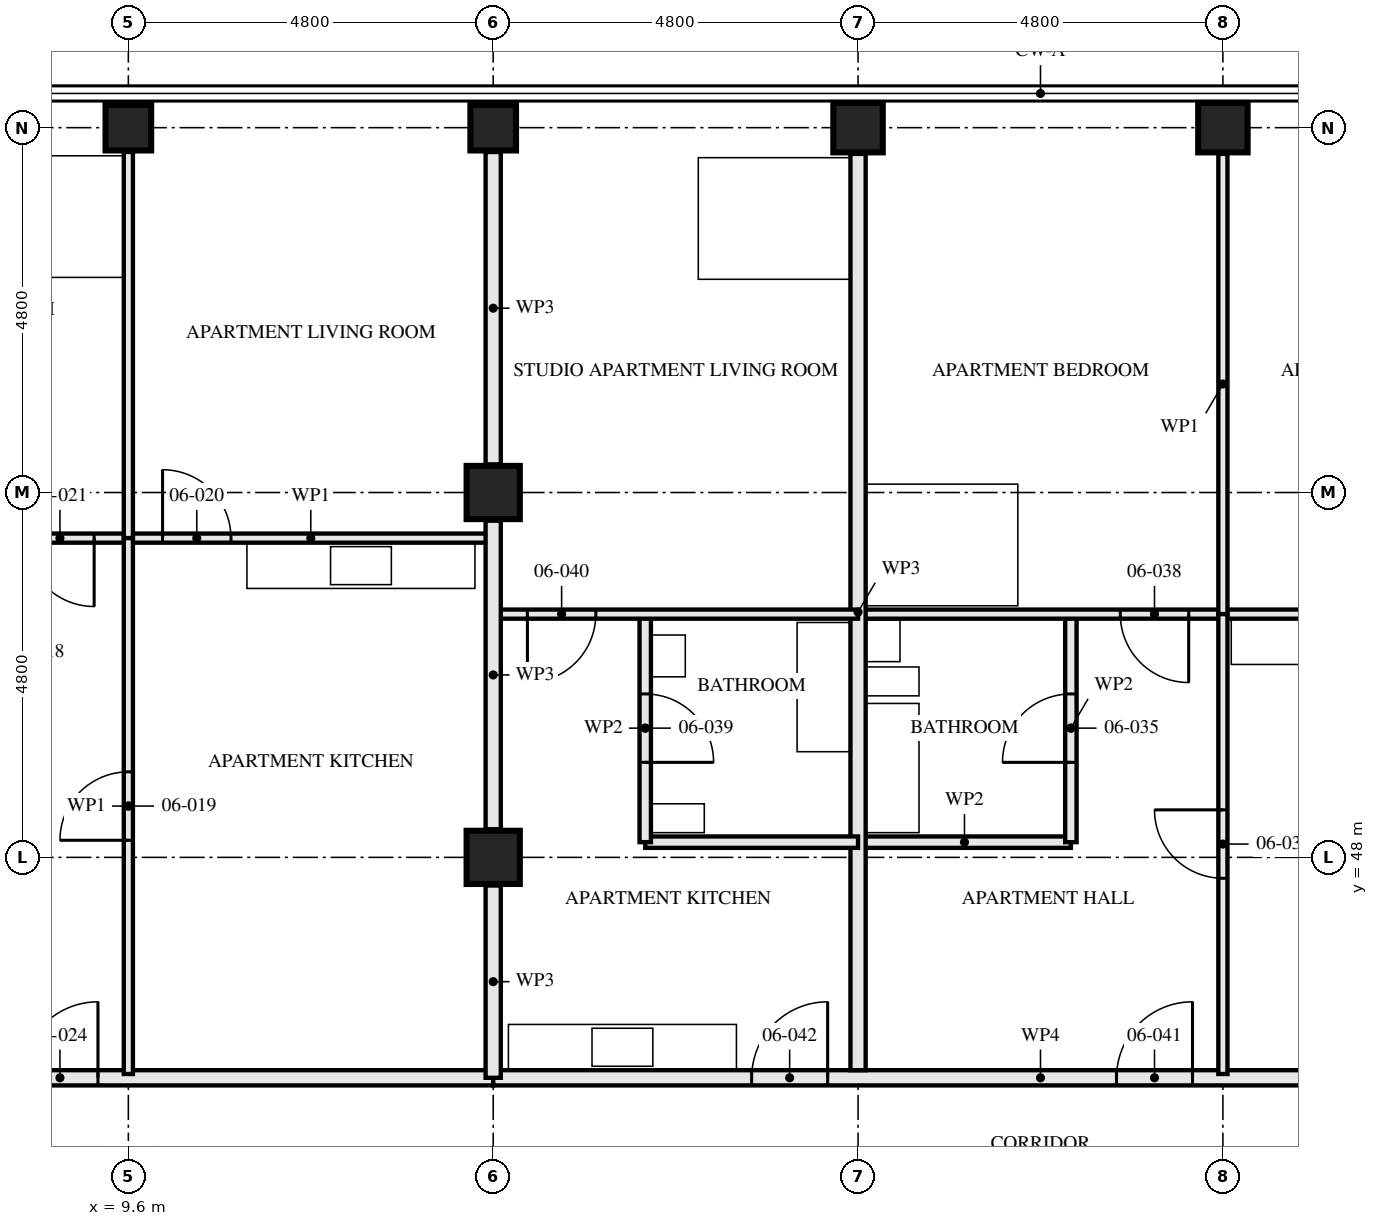
"""IFC4 building model, lengths in metres.
Left out: names, types, materials, properties, quantities, classifications, styles, units other than length and angle.
Written with IfcOpenShell. Run it as: python <this file> out.ifc"""

import sys

from ifc_helpers import new_model, si_unit, direction, frame, frame_2d, origin, origin_2d, place, context, subcontext, project, spatial, rectangle, hollow_rectangle, extrude, element, fill, save


model = new_model("IFC4")
c1 = context("Model", 3, precision=1e-05, world=origin(), true_north=direction((0.0, 1.0)))
c2 = subcontext(c1, "Body", "Model", "MODEL_VIEW")
j1 = project(units=[si_unit("LENGTHUNIT", "METRE"), si_unit("PLANEANGLEUNIT", "RADIAN")], contexts=[c1])
p1 = place(None, origin())
s1 = spatial("IfcSite", under=j1, at=p1, CompositionType="ELEMENT")
p2 = place(p1, origin())
s2 = spatial("IfcBuilding", under=s1, at=p2, CompositionType="ELEMENT")
p3 = place(p2, frame((0.0, 0.0, 27.0)))
s3 = spatial("IfcBuildingStorey", under=s2, at=p3, CompositionType="ELEMENT", Elevation=27.0)
p4 = place(p3, frame((9.6, 57.6, 0.0), z_axis=(0.0, 0.0, 1.0), x_axis=(0.0, 1.0, 0.0)))
e1 = element("IfcColumn", 1, at=p4, inside=s3, PredefinedType="COLUMN", context=c2, shape_type="SweptSolid", body=[
    extrude(hollow_rectangle(XDim=0.6, YDim=0.6, WallThickness=0.08, at=origin_2d()), origin(), (0.0, 0.0, 1.0), 3.5),
])
for number, where, z_axis, x_axis in (
    (2, (14.4, 48.0, 0.0), (0.0, 0.0, 1.0), (1.0, 0.0, 0.0)),
    (3, (14.4, 52.8, 0.0), (0.0, 0.0, 1.0), (1.0, 0.0, 0.0)),
):
    element("IfcColumn", number, at=place(p3, frame(where, z_axis=z_axis, x_axis=x_axis)), inside=s3, PredefinedType="COLUMN", context=c2, shape_type="SweptSolid", body=[
        extrude(hollow_rectangle(XDim=0.7, YDim=0.7, WallThickness=0.06, at=origin_2d()), origin(), (0.0, 0.0, 1.0), 3.5),
    ])
p5 = place(p3, frame((14.4, 57.6, 0.0), z_axis=(0.0, 0.0, 1.0), x_axis=(0.0, 1.0, 0.0)))
e4 = element("IfcColumn", 4, at=p5, inside=s3, PredefinedType="COLUMN", context=c2, shape_type="SweptSolid", body=[
    extrude(hollow_rectangle(XDim=0.6, YDim=0.6, WallThickness=0.08, at=origin_2d()), origin(), (0.0, 0.0, 1.0), 3.5),
])
for number, where, z_axis, x_axis in (
    (5, (19.2, 57.6, 0.0), (0.0, 0.0, 1.0), (0.0, 1.0, 0.0)),
    (6, (24.0, 57.6, 0.0), (0.0, 0.0, 1.0), (0.0, 1.0, 0.0)),
):
    element("IfcColumn", number, at=place(p3, frame(where, z_axis=z_axis, x_axis=x_axis)), inside=s3, PredefinedType="COLUMN", context=c2, shape_type="SweptSolid", body=[
        extrude(hollow_rectangle(XDim=0.65, YDim=0.65, WallThickness=0.08, at=origin_2d()), origin(), (0.0, 0.0, 1.0), 3.5),
    ])
p6 = place(p3, frame((9.6, 52.2, 0.0), z_axis=(0.0, 0.0, 1.0), x_axis=(0.0, -1.0, 0.0)))
e7 = element("IfcWall", 7, at=p6, inside=s3, PredefinedType="PARTITIONING", context=c2, shape_type="SweptSolid", body=[
    extrude(rectangle(XDim=7.05, YDim=0.12, at=frame_2d((3.525, 0.0))), origin(), (0.0, 0.0, 1.0), 2.55),
])
p7 = place(p6, frame((3.075, 0.0, 0.0)))
e8 = element("IfcOpeningElement", 8, at=p7, cuts=e7, PredefinedType="OPENING", context=c2, shape_type="SweptSolid", body=[
    extrude(rectangle(XDim=0.9, YDim=2.1, at=frame_2d((0.45, 1.05))), frame((0.0, 0.071, 0.0), z_axis=(0.0, -1.0, 0.0), x_axis=(1.0, 0.0, 0.0)), (0.0, 0.0, 1.0), 0.141),
])
p8 = place(p3, frame((14.4, 52.2, 0.0), z_axis=(0.0, 0.0, 1.0), x_axis=(-1.0, 0.0, 0.0)))
e9 = element("IfcWall", 9, at=p8, inside=s3, PredefinedType="PARTITIONING", context=c2, shape_type="SweptSolid", body=[
    extrude(rectangle(XDim=4.8, YDim=0.12, at=frame_2d((2.4, 0.0))), origin(), (0.0, 0.0, 1.0), 3.33),
])
p9 = place(p8, frame((3.45, 0.0, 0.0)))
e10 = element("IfcOpeningElement", 10, at=p9, cuts=e9, PredefinedType="OPENING", context=c2, shape_type="SweptSolid", body=[
    extrude(rectangle(XDim=0.9, YDim=2.1, at=frame_2d((0.45, 1.05))), frame((0.0, 0.071, 0.0), z_axis=(0.0, -1.0, 0.0), x_axis=(1.0, 0.0, 0.0)), (0.0, 0.0, 1.0), 0.141),
])
p10 = place(p3, frame((9.6, 52.2, 0.0), z_axis=(0.0, 0.0, 1.0), x_axis=(-1.0, 0.0, 0.0)))
e11 = element("IfcWall", 11, at=p10, inside=s3, PredefinedType="PARTITIONING", context=c2, shape_type="SweptSolid", body=[
    extrude(rectangle(XDim=4.8, YDim=0.12, at=frame_2d((2.4, 0.0))), origin(), (0.0, 0.0, 1.0), 3.33),
])
p11 = place(p10, frame((0.45, 0.0, 0.0)))
e12 = element("IfcOpeningElement", 12, at=p11, cuts=e11, PredefinedType="OPENING", context=c2, shape_type="SweptSolid", body=[
    extrude(rectangle(XDim=0.9, YDim=2.1, at=frame_2d((0.45, 1.05))), frame((0.0, 0.071, 0.0), z_axis=(0.0, -1.0, 0.0), x_axis=(1.0, 0.0, 0.0)), (0.0, 0.0, 1.0), 0.141),
])
p12 = place(p3, frame((9.6, 57.28, 0.0), z_axis=(0.0, 0.0, 1.0), x_axis=(0.0, -1.0, 0.0)))
e13 = element("IfcWall", 13, at=p12, inside=s3, PredefinedType="PARTITIONING", context=c2, shape_type="SweptSolid", body=[
    extrude(rectangle(XDim=5.08, YDim=0.12, at=frame_2d((2.54, 0.0))), origin(), (0.0, 0.0, 1.0), 2.55),
])
p13 = place(p3, frame((14.4, 45.1, 0.0), z_axis=(0.0, 0.0, 1.0), x_axis=(-1.0, 0.0, 0.0)))
e14 = element("IfcWall", 14, at=p13, inside=s3, PredefinedType="PARTITIONING", context=c2, shape_type="SweptSolid", body=[
    extrude(rectangle(XDim=9.6, YDim=0.2, at=frame_2d((4.8, 0.0))), origin(), (0.0, 0.0, 1.0), 3.33),
])
p14 = place(p13, frame((5.2, 0.0, 0.0)))
e15 = element("IfcOpeningElement", 15, at=p14, cuts=e14, PredefinedType="OPENING", context=c2, shape_type="SweptSolid", body=[
    extrude(rectangle(XDim=1.0, YDim=2.1, at=frame_2d((0.5, 1.05))), frame((0.0, 0.111, 0.0), z_axis=(0.0, -1.0, 0.0), x_axis=(1.0, 0.0, 0.0)), (0.0, 0.0, 1.0), 0.221),
])
p15 = place(p3, frame((22.0, 51.2, 0.0), z_axis=(0.0, 0.0, 1.0), x_axis=(0.0, -1.0, 0.0)))
e16 = element("IfcWall", 16, at=p15, inside=s3, PredefinedType="PARTITIONING", context=c2, shape_type="SweptSolid", body=[
    extrude(rectangle(XDim=3.0, YDim=0.15, at=frame_2d((1.5, 0.0))), origin(), (0.0, 0.0, 1.0), 3.33),
])
p16 = place(p15, frame((1.05, 0.0, 0.0)))
e17 = element("IfcOpeningElement", 17, at=p16, cuts=e16, PredefinedType="OPENING", context=c2, shape_type="SweptSolid", body=[
    extrude(rectangle(XDim=0.9, YDim=2.1, at=frame_2d((0.45, 1.05))), frame((0.0, 0.085, 0.0), z_axis=(0.0, -1.0, 0.0), x_axis=(1.0, 0.0, 0.0)), (0.0, 0.0, 1.0), 0.171),
])
p17 = place(p3, frame((22.0, 48.2, 0.0), z_axis=(0.0, 0.0, 1.0), x_axis=(-1.0, 0.0, 0.0)))
e18 = element("IfcWall", 18, at=p17, inside=s3, PredefinedType="PARTITIONING", context=c2, shape_type="SweptSolid", body=[
    extrude(rectangle(XDim=2.8, YDim=0.15, at=frame_2d((1.4, 0.0))), origin(), (0.0, 0.0, 1.0), 3.33),
])
p18 = place(p3, frame((24.0, 51.2, 0.0), z_axis=(0.0, 0.0, 1.0), x_axis=(0.0, -1.0, 0.0)))
e19 = element("IfcWall", 19, at=p18, inside=s3, PredefinedType="PARTITIONING", context=c2, shape_type="SweptSolid", body=[
    extrude(rectangle(XDim=6.05, YDim=0.12, at=frame_2d((3.025, 0.0))), origin(), (0.0, 0.0, 1.0), 2.55),
])
p19 = place(p18, frame((2.575, 0.0, 0.0)))
e20 = element("IfcOpeningElement", 20, at=p19, cuts=e19, PredefinedType="OPENING", context=c2, shape_type="SweptSolid", body=[
    extrude(rectangle(XDim=0.9, YDim=2.1, at=frame_2d((0.45, 1.05))), frame((0.0, 0.071, 0.0), z_axis=(0.0, -1.0, 0.0), x_axis=(1.0, 0.0, 0.0)), (0.0, 0.0, 1.0), 0.141),
])
p20 = place(p3, frame((28.8, 51.2, 0.0), z_axis=(0.0, 0.0, 1.0), x_axis=(-1.0, 0.0, 0.0)))
e21 = element("IfcWall", 21, at=p20, inside=s3, PredefinedType="PARTITIONING", context=c2, shape_type="SweptSolid", body=[
    extrude(rectangle(XDim=4.8, YDim=0.12, at=frame_2d((2.4, 0.0))), origin(), (0.0, 0.0, 1.0), 3.33),
])
p21 = place(p20, frame((0.45, 0.0, 0.0)))
e22 = element("IfcOpeningElement", 22, at=p21, cuts=e21, PredefinedType="OPENING", context=c2, shape_type="SweptSolid", body=[
    extrude(rectangle(XDim=0.9, YDim=2.1, at=frame_2d((0.45, 1.05))), frame((0.0, 0.071, 0.0), z_axis=(0.0, -1.0, 0.0), x_axis=(1.0, 0.0, 0.0)), (0.0, 0.0, 1.0), 0.141),
])
p22 = place(p3, frame((24.0, 51.2, 0.0), z_axis=(0.0, 0.0, 1.0), x_axis=(-1.0, 0.0, 0.0)))
e23 = element("IfcWall", 23, at=p22, inside=s3, PredefinedType="PARTITIONING", context=c2, shape_type="SweptSolid", body=[
    extrude(rectangle(XDim=4.8, YDim=0.12, at=frame_2d((2.4, 0.0))), origin(), (0.0, 0.0, 1.0), 3.33),
])
p23 = place(p22, frame((0.45, 0.0, 0.0)))
e24 = element("IfcOpeningElement", 24, at=p23, cuts=e23, PredefinedType="OPENING", context=c2, shape_type="SweptSolid", body=[
    extrude(rectangle(XDim=0.9, YDim=2.1, at=frame_2d((0.45, 1.05))), frame((0.0, 0.071, 0.0), z_axis=(0.0, -1.0, 0.0), x_axis=(1.0, 0.0, 0.0)), (0.0, 0.0, 1.0), 0.141),
])
p24 = place(p3, frame((24.0, 57.255, 0.0), z_axis=(0.0, 0.0, 1.0), x_axis=(0.0, -1.0, 0.0)))
e25 = element("IfcWall", 25, at=p24, inside=s3, PredefinedType="PARTITIONING", context=c2, shape_type="SweptSolid", body=[
    extrude(rectangle(XDim=6.055, YDim=0.12, at=frame_2d((3.027, 0.0))), origin(), (0.0, 0.0, 1.0), 2.55),
])
p25 = place(p3, frame((19.2, 57.255, 0.0), z_axis=(0.0, 0.0, 1.0), x_axis=(0.0, -1.0, 0.0)))
e26 = element("IfcWall", 26, at=p25, inside=s3, PredefinedType="PARTITIONING", context=c2, shape_type="SweptSolid", body=[
    extrude(rectangle(XDim=12.055, YDim=0.2, at=frame_2d((6.027, 0.0))), origin(), (0.0, 0.0, 1.0), 2.55),
])
p26 = place(p3, frame((16.4, 51.2, 0.0), z_axis=(0.0, 0.0, 1.0), x_axis=(0.0, -1.0, 0.0)))
e27 = element("IfcWall", 27, at=p26, inside=s3, PredefinedType="PARTITIONING", context=c2, shape_type="SweptSolid", body=[
    extrude(rectangle(XDim=3.0, YDim=0.15, at=frame_2d((1.5, 0.0))), origin(), (0.0, 0.0, 1.0), 3.33),
])
p27 = place(p26, frame((1.05, 0.0, 0.0)))
e28 = element("IfcOpeningElement", 28, at=p27, cuts=e27, PredefinedType="OPENING", context=c2, shape_type="SweptSolid", body=[
    extrude(rectangle(XDim=0.9, YDim=2.1, at=frame_2d((0.45, 1.05))), frame((0.0, 0.085, 0.0), z_axis=(0.0, -1.0, 0.0), x_axis=(1.0, 0.0, 0.0)), (0.0, 0.0, 1.0), 0.171),
])
p28 = place(p3, frame((19.2, 48.2, 0.0), z_axis=(0.0, 0.0, 1.0), x_axis=(-1.0, 0.0, 0.0)))
e29 = element("IfcWall", 29, at=p28, inside=s3, PredefinedType="PARTITIONING", context=c2, shape_type="SweptSolid", body=[
    extrude(rectangle(XDim=2.8, YDim=0.15, at=frame_2d((1.4, 0.0))), origin(), (0.0, 0.0, 1.0), 3.33),
])
p29 = place(p3, frame((19.2, 51.2, 0.0), z_axis=(0.0, 0.0, 1.0), x_axis=(-1.0, 0.0, 0.0)))
e30 = element("IfcWall", 30, at=p29, inside=s3, PredefinedType="PARTITIONING", context=c2, shape_type="SweptSolid", body=[
    extrude(rectangle(XDim=4.8, YDim=0.12, at=frame_2d((2.4, 0.0))), origin(), (0.0, 0.0, 1.0), 3.33),
])
p30 = place(p29, frame((3.45, 0.0, 0.0)))
e31 = element("IfcOpeningElement", 31, at=p30, cuts=e30, PredefinedType="OPENING", context=c2, shape_type="SweptSolid", body=[
    extrude(rectangle(XDim=0.9, YDim=2.1, at=frame_2d((0.45, 1.05))), frame((0.0, 0.071, 0.0), z_axis=(0.0, -1.0, 0.0), x_axis=(1.0, 0.0, 0.0)), (0.0, 0.0, 1.0), 0.141),
])
p31 = place(p3, frame((28.8, 45.1, 0.0), z_axis=(0.0, 0.0, 1.0), x_axis=(-1.0, 0.0, 0.0)))
e32 = element("IfcWall", 32, at=p31, inside=s3, PredefinedType="PARTITIONING", context=c2, shape_type="SweptSolid", body=[
    extrude(rectangle(XDim=14.4, YDim=0.2, at=frame_2d((7.2, 0.0))), origin(), (0.0, 0.0, 1.0), 3.33),
])
p32 = place(p31, frame((5.2, 0.0, 0.0)))
e33 = element("IfcOpeningElement", 33, at=p32, cuts=e32, PredefinedType="OPENING", context=c2, shape_type="SweptSolid", body=[
    extrude(rectangle(XDim=1.0, YDim=2.1, at=frame_2d((0.5, 1.05))), frame((0.0, 0.111, 0.0), z_axis=(0.0, -1.0, 0.0), x_axis=(1.0, 0.0, 0.0)), (0.0, 0.0, 1.0), 0.221),
])
p33 = place(p31, frame((10.0, 0.0, 0.0)))
e34 = element("IfcOpeningElement", 34, at=p33, cuts=e32, PredefinedType="OPENING", context=c2, shape_type="SweptSolid", body=[
    extrude(rectangle(XDim=1.0, YDim=2.1, at=frame_2d((0.5, 1.05))), frame((0.0, 0.111, 0.0), z_axis=(0.0, -1.0, 0.0), x_axis=(1.0, 0.0, 0.0)), (0.0, 0.0, 1.0), 0.221),
])
p34 = place(p3, frame((14.4, 45.1, 0.0), z_axis=(0.0, 0.0, 1.0), x_axis=(0.0, 1.0, 0.0)))
e35 = element("IfcWall", 35, at=p34, inside=s3, PredefinedType="PARTITIONING", context=c2, shape_type="SweptSolid", body=[
    extrude(rectangle(XDim=2.53, YDim=0.2, at=frame_2d((1.265, 0.0))), origin(), (0.0, 0.0, 1.0), 2.32),
])
p35 = place(p3, frame((14.4, 48.37, 0.0), z_axis=(0.0, 0.0, 1.0), x_axis=(0.0, 1.0, 0.0)))
e36 = element("IfcWall", 36, at=p35, inside=s3, PredefinedType="PARTITIONING", context=c2, shape_type="SweptSolid", body=[
    extrude(rectangle(XDim=4.06, YDim=0.2, at=frame_2d((2.03, 0.0))), origin(), (0.0, 0.0, 1.0), 2.32),
])
p36 = place(p3, frame((14.4, 53.17, 0.0), z_axis=(0.0, 0.0, 1.0), x_axis=(0.0, 1.0, 0.0)))
e37 = element("IfcWall", 37, at=p36, inside=s3, PredefinedType="PARTITIONING", context=c2, shape_type="SweptSolid", body=[
    extrude(rectangle(XDim=4.11, YDim=0.2, at=frame_2d((2.055, 0.0))), origin(), (0.0, 0.0, 1.0), 2.32),
])
p37 = place(p7, frame((0.9, 0.0, 0.0), z_axis=(0.0, 0.0, 1.0), x_axis=(-1.0, 0.0, 0.0)))
e38 = element("IfcDoor", 38, at=p37, inside=s3, OperationType="SINGLE_SWING_RIGHT", PredefinedType="DOOR", context=c2, shape_type="SweptSolid", body=[
    extrude(rectangle(XDim=0.9, YDim=2.1, at=frame_2d((0.45, 1.05))), frame((0.0, 0.022, 0.0), z_axis=(0.0, -1.0, 0.0), x_axis=(1.0, 0.0, 0.0)), (0.0, 0.0, 1.0), 0.044),
])
fill(e8, e38)
p38 = place(p9, frame((0.9, 0.0, 0.0), z_axis=(0.0, 0.0, 1.0), x_axis=(-1.0, 0.0, 0.0)))
e39 = element("IfcDoor", 39, at=p38, inside=s3, OperationType="SINGLE_SWING_RIGHT", PredefinedType="DOOR", context=c2, shape_type="SweptSolid", body=[
    extrude(rectangle(XDim=0.9, YDim=2.1, at=frame_2d((0.45, 1.05))), frame((0.0, 0.022, 0.0), z_axis=(0.0, -1.0, 0.0), x_axis=(1.0, 0.0, 0.0)), (0.0, 0.0, 1.0), 0.044),
])
fill(e10, e39)
p39 = place(p11, origin())
e40 = element("IfcDoor", 40, at=p39, inside=s3, OperationType="SINGLE_SWING_RIGHT", PredefinedType="DOOR", context=c2, shape_type="SweptSolid", body=[
    extrude(rectangle(XDim=0.9, YDim=2.1, at=frame_2d((0.45, 1.05))), frame((0.0, 0.022, 0.0), z_axis=(0.0, -1.0, 0.0), x_axis=(1.0, 0.0, 0.0)), (0.0, 0.0, 1.0), 0.044),
])
fill(e12, e40)
p40 = place(p14, frame((1.0, 0.0, 0.0), z_axis=(0.0, 0.0, 1.0), x_axis=(-1.0, 0.0, 0.0)))
e41 = element("IfcDoor", 41, at=p40, inside=s3, OperationType="SINGLE_SWING_LEFT", PredefinedType="DOOR", context=c2, shape_type="SweptSolid", body=[
    extrude(rectangle(XDim=1.0, YDim=2.1, at=frame_2d((0.5, 1.05))), frame((0.0, 0.027, 0.0), z_axis=(0.0, -1.0, 0.0), x_axis=(1.0, 0.0, 0.0)), (0.0, 0.0, 1.0), 0.054),
])
fill(e15, e41)
p41 = place(p16, frame((0.9, 0.0, 0.0), z_axis=(0.0, 0.0, 1.0), x_axis=(-1.0, 0.0, 0.0)))
e42 = element("IfcDoor", 42, at=p41, inside=s3, OperationType="SINGLE_SWING_RIGHT", PredefinedType="DOOR", context=c2, shape_type="SweptSolid", body=[
    extrude(rectangle(XDim=0.9, YDim=2.1, at=frame_2d((0.45, 1.05))), frame((0.0, 0.022, 0.0), z_axis=(0.0, -1.0, 0.0), x_axis=(1.0, 0.0, 0.0)), (0.0, 0.0, 1.0), 0.044),
])
fill(e17, e42)
p42 = place(p19, frame((0.9, 0.0, 0.0), z_axis=(0.0, 0.0, 1.0), x_axis=(-1.0, 0.0, 0.0)))
e43 = element("IfcDoor", 43, at=p42, inside=s3, OperationType="SINGLE_SWING_LEFT", PredefinedType="DOOR", context=c2, shape_type="SweptSolid", body=[
    extrude(rectangle(XDim=0.9, YDim=2.1, at=frame_2d((0.45, 1.05))), frame((0.0, 0.022, 0.0), z_axis=(0.0, -1.0, 0.0), x_axis=(1.0, 0.0, 0.0)), (0.0, 0.0, 1.0), 0.044),
])
fill(e20, e43)
p43 = place(p23, origin())
e44 = element("IfcDoor", 44, at=p43, inside=s3, OperationType="SINGLE_SWING_RIGHT", PredefinedType="DOOR", context=c2, shape_type="SweptSolid", body=[
    extrude(rectangle(XDim=0.9, YDim=2.1, at=frame_2d((0.45, 1.05))), frame((0.0, 0.022, 0.0), z_axis=(0.0, -1.0, 0.0), x_axis=(1.0, 0.0, 0.0)), (0.0, 0.0, 1.0), 0.044),
])
fill(e24, e44)
p44 = place(p27, origin())
e45 = element("IfcDoor", 45, at=p44, inside=s3, OperationType="SINGLE_SWING_LEFT", PredefinedType="DOOR", context=c2, shape_type="SweptSolid", body=[
    extrude(rectangle(XDim=0.9, YDim=2.1, at=frame_2d((0.45, 1.05))), frame((0.0, 0.022, 0.0), z_axis=(0.0, -1.0, 0.0), x_axis=(1.0, 0.0, 0.0)), (0.0, 0.0, 1.0), 0.044),
])
fill(e28, e45)
p45 = place(p30, origin())
e46 = element("IfcDoor", 46, at=p45, inside=s3, OperationType="SINGLE_SWING_LEFT", PredefinedType="DOOR", context=c2, shape_type="SweptSolid", body=[
    extrude(rectangle(XDim=0.9, YDim=2.1, at=frame_2d((0.45, 1.05))), frame((0.0, 0.022, 0.0), z_axis=(0.0, -1.0, 0.0), x_axis=(1.0, 0.0, 0.0)), (0.0, 0.0, 1.0), 0.044),
])
fill(e31, e46)
p46 = place(p32, frame((1.0, 0.0, 0.0), z_axis=(0.0, 0.0, 1.0), x_axis=(-1.0, 0.0, 0.0)))
e47 = element("IfcDoor", 47, at=p46, inside=s3, OperationType="SINGLE_SWING_LEFT", PredefinedType="DOOR", context=c2, shape_type="SweptSolid", body=[
    extrude(rectangle(XDim=1.0, YDim=2.1, at=frame_2d((0.5, 1.05))), frame((0.0, 0.027, 0.0), z_axis=(0.0, -1.0, 0.0), x_axis=(1.0, 0.0, 0.0)), (0.0, 0.0, 1.0), 0.054),
])
fill(e33, e47)
p47 = place(p33, frame((1.0, 0.0, 0.0), z_axis=(0.0, 0.0, 1.0), x_axis=(-1.0, 0.0, 0.0)))
e48 = element("IfcDoor", 48, at=p47, inside=s3, OperationType="SINGLE_SWING_LEFT", PredefinedType="DOOR", context=c2, shape_type="SweptSolid", body=[
    extrude(rectangle(XDim=1.0, YDim=2.1, at=frame_2d((0.5, 1.05))), frame((0.0, 0.027, 0.0), z_axis=(0.0, -1.0, 0.0), x_axis=(1.0, 0.0, 0.0)), (0.0, 0.0, 1.0), 0.054),
])
fill(e34, e48)
save(model, sys.argv[1])
